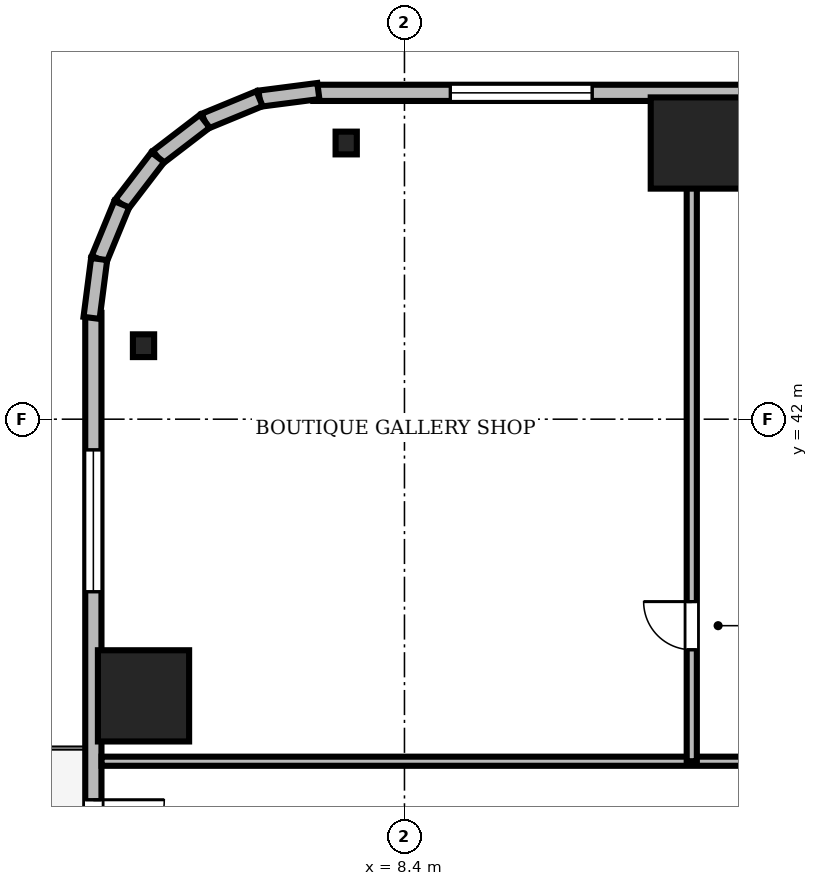
"""IFC4 building model, lengths in metres.
Left out: names, types, materials, properties, quantities, classifications, styles, units other than length and angle.
Written with IfcOpenShell. Run it as: python <this file> out.ifc"""

import sys

from ifc_helpers import new_model, si_unit, direction, frame, frame_2d, origin, origin_2d, place, context, subcontext, project, spatial, rectangle, i_section, extrude, source, transform, mapped, element, fill, save


model = new_model("IFC4")
c1 = context("Model", 3, precision=1e-05, world=origin(), true_north=direction((0.0, 1.0)))
c2 = subcontext(c1, "Body", "Model", "MODEL_VIEW")
j1 = project(units=[si_unit("LENGTHUNIT", "METRE"), si_unit("PLANEANGLEUNIT", "RADIAN")], contexts=[c1])
p1 = place(None, origin())
s1 = spatial("IfcSite", under=j1, at=p1, CompositionType="ELEMENT")
p2 = place(p1, origin())
s2 = spatial("IfcBuilding", under=s1, at=p2, CompositionType="ELEMENT")
p3 = place(p2, frame((0.0, 0.0, 78.7)))
s3 = spatial("IfcBuildingStorey", under=s2, at=p3, CompositionType="ELEMENT", Elevation=78.7)
m1 = source(origin(), c2, "Body", "SweptSolid", [
    extrude(rectangle(XDim=1.8, YDim=1.8, at=origin_2d()), origin(), (0.0, 0.0, 1.0), 3.41),
])
for number, where, z_axis, x_axis in (
    (1, (14.16, 47.45, 0.0), (0.0, 0.0, 1.0), (1.0, 0.0, 0.0)),
    (2, (3.25, 36.54, 0.0), (0.0, 0.0, 1.0), (1.0, 0.0, 0.0)),
):
    element("IfcColumn", number, at=place(p3, frame(where, z_axis=z_axis, x_axis=x_axis)), inside=s3, PredefinedType="COLUMN", context=c2, shape_type="MappedRepresentation", body=[
        mapped(m1, transform((0.0, 0.0, 0.0), scale=1.0)),
    ])
m2 = source(origin(), c2, "Body", "SweptSolid", [
    extrude(i_section(OverallWidth=0.419, OverallDepth=0.449, WebThickness=0.031, FlangeThickness=0.048, FilletRadius=0.015, at=origin_2d()), origin(), (0.0, 0.0, 1.0), 3.41),
])
for number, where, z_axis, x_axis in (
    (3, (7.25, 47.45, 0.0), (0.0, 0.0, 1.0), (1.0, 0.0, 0.0)),
    (4, (3.25, 43.45, 0.0), (0.0, 0.0, 1.0), (1.0, 0.0, 0.0)),
):
    element("IfcColumn", number, at=place(p3, frame(where, z_axis=z_axis, x_axis=x_axis)), inside=s3, PredefinedType="COLUMN", context=c2, shape_type="MappedRepresentation", body=[
        mapped(m2, transform((0.0, 0.0, 0.0), scale=1.0)),
    ])
m3 = source(origin(), c2, "Body", "SweptSolid", [
    extrude(rectangle(XDim=15.6, YDim=0.32, at=frame_2d((7.8, 0.0))), origin(), (0.0, 0.0, 1.0), 3.41),
])
p4 = place(p3, frame((22.2, 48.44, 0.0), z_axis=(0.0, 0.0, 1.0), x_axis=(-1.0, 0.0, 0.0)))
e5 = element("IfcWall", 5, at=p4, inside=s3, PredefinedType="SOLIDWALL", context=c2, shape_type="MappedRepresentation", body=[
    mapped(m3, transform((0.0, 0.0, 0.0), scale=1.0)),
])
m4 = source(origin(), c2, "Body", "SweptSolid", [
    extrude(rectangle(XDim=2.8, YDim=2.4, at=frame_2d((1.4, 1.2))), frame((0.0, 0.17, 0.0), z_axis=(0.0, -1.0, 0.0), x_axis=(1.0, 0.0, 0.0)), (0.0, 0.0, 1.0), 0.34),
])
p5 = place(p4, frame((10.095, 0.0, 0.72)))
e6 = element("IfcOpeningElement", 6, at=p5, cuts=e5, PredefinedType="OPENING", context=c2, shape_type="MappedRepresentation", body=[
    mapped(m4, transform((0.0, 0.0, 0.0), scale=1.0)),
])
m5 = source(origin(), c2, "Body", "SweptSolid", [
    extrude(rectangle(XDim=15.6, YDim=0.32, at=frame_2d((7.8, 0.0))), origin(), (0.0, 0.0, 1.0), 3.41),
])
p6 = place(p3, frame((2.26, 44.1, 0.0), z_axis=(0.0, 0.0, 1.0), x_axis=(0.0, -1.0, 0.0)))
e7 = element("IfcWall", 7, at=p6, inside=s3, PredefinedType="SOLIDWALL", context=c2, shape_type="MappedRepresentation", body=[
    mapped(m5, transform((0.0, 0.0, 0.0), scale=1.0)),
])
m6 = source(origin(), c2, "Body", "SweptSolid", [
    extrude(rectangle(XDim=1.4, YDim=2.3, at=frame_2d((0.7, 1.15))), frame((0.0, 0.17, 0.0), z_axis=(0.0, -1.0, 0.0), x_axis=(1.0, 0.0, 0.0)), (0.0, 0.0, 1.0), 0.34),
])
p7 = place(p6, frame((9.61, 0.0, 0.0)))
e8 = element("IfcOpeningElement", 8, at=p7, cuts=e7, PredefinedType="OPENING", context=c2, shape_type="MappedRepresentation", body=[
    mapped(m6, transform((0.0, 0.0, 0.0), scale=1.0)),
])
p8 = place(p6, frame((2.705, 0.0, 0.72)))
e9 = element("IfcOpeningElement", 9, at=p8, cuts=e7, PredefinedType="OPENING", context=c2, shape_type="MappedRepresentation", body=[
    mapped(m4, transform((0.0, 0.0, 0.0), scale=1.0)),
])
m7 = source(origin(), c2, "Body", "SweptSolid", [
    extrude(rectangle(XDim=1.17, YDim=0.32, at=frame_2d((0.585, 0.0))), origin(), (0.0, 0.0, 1.0), 3.41),
])
p9 = place(p3, frame((6.7, 48.476, 0.0), z_axis=(0.0, 0.0, 1.0), x_axis=(-0.991735963317, -0.128295670475, 0.0)))
e10 = element("IfcWall", 10, at=p9, inside=s3, PredefinedType="SOLIDWALL", context=c2, shape_type="MappedRepresentation", body=[
    mapped(m7, transform((0.0, 0.0, 0.0), scale=1.0)),
])
m8 = source(origin(), c2, "Body", "SweptSolid", [
    extrude(rectangle(XDim=1.169, YDim=0.32, at=frame_2d((0.584, 0.0))), origin(), (0.0, 0.0, 1.0), 3.41),
])
p10 = place(p3, frame((5.54, 48.325, 0.0), z_axis=(0.0, 0.0, 1.0), x_axis=(-0.924552646638, -0.381054331552, 0.0)))
e11 = element("IfcWall", 11, at=p10, inside=s3, PredefinedType="SOLIDWALL", context=c2, shape_type="MappedRepresentation", body=[
    mapped(m8, transform((0.0, 0.0, 0.0), scale=1.0)),
])
m9 = source(origin(), c2, "Body", "SweptSolid", [
    extrude(rectangle(XDim=1.169, YDim=0.32, at=frame_2d((0.584, 0.0))), origin(), (0.0, 0.0, 1.0), 3.41),
])
p11 = place(p3, frame((4.459, 47.88, 0.0), z_axis=(0.0, 0.0, 1.0), x_axis=(-0.793663520347, -0.608356981114, 0.0)))
e12 = element("IfcWall", 12, at=p11, inside=s3, PredefinedType="SOLIDWALL", context=c2, shape_type="MappedRepresentation", body=[
    mapped(m9, transform((0.0, 0.0, 0.0), scale=1.0)),
])
m10 = source(origin(), c2, "Body", "SweptSolid", [
    extrude(rectangle(XDim=1.169, YDim=0.32, at=frame_2d((0.584, 0.0))), origin(), (0.0, 0.0, 1.0), 3.41),
])
p12 = place(p3, frame((3.531, 47.169, 0.0), z_axis=(0.0, 0.0, 1.0), x_axis=(-0.608387696831, -0.793639975269, 0.0)))
e13 = element("IfcWall", 13, at=p12, inside=s3, PredefinedType="SOLIDWALL", context=c2, shape_type="MappedRepresentation", body=[
    mapped(m10, transform((0.0, 0.0, 0.0), scale=1.0)),
])
p13 = place(p3, frame((2.82, 46.241, 0.0), z_axis=(0.0, 0.0, 1.0), x_axis=(-0.381054331552, -0.924552646638, 0.0)))
e14 = element("IfcWall", 14, at=p13, inside=s3, PredefinedType="SOLIDWALL", context=c2, shape_type="MappedRepresentation", body=[
    mapped(m8, transform((0.0, 0.0, 0.0), scale=1.0)),
])
p14 = place(p3, frame((2.375, 45.16, 0.0), z_axis=(0.0, 0.0, 1.0), x_axis=(-0.128295670475, -0.991735963317, 0.0)))
e15 = element("IfcWall", 15, at=p14, inside=s3, PredefinedType="SOLIDWALL", context=c2, shape_type="MappedRepresentation", body=[
    mapped(m7, transform((0.0, 0.0, 0.0), scale=1.0)),
])
m11 = source(origin(), c2, "Body", "SweptSolid", [
    extrude(rectangle(XDim=19.078, YDim=0.18, at=frame_2d((9.539, 0.0))), origin(), (0.0, 0.0, 1.0), 2.652),
])
p15 = place(p3, frame((2.422, 35.25, 0.0), z_axis=(0.0, 0.0, 1.0), x_axis=(1.0, 0.0, 0.0)))
e16 = element("IfcWall", 16, at=p15, inside=s3, PredefinedType="PARTITIONING", context=c2, shape_type="MappedRepresentation", body=[
    mapped(m11, transform((0.0, 0.0, 0.0), scale=1.0)),
])
m12 = source(origin(), c2, "Body", "SweptSolid", [
    extrude(rectangle(XDim=1.05, YDim=2.2, at=frame_2d((0.525, 1.1))), frame((0.0, 0.1, 0.0), z_axis=(0.0, -1.0, 0.0), x_axis=(1.0, 0.0, 0.0)), (0.0, 0.0, 1.0), 0.2),
])
p16 = place(p15, frame((14.843, 0.0, 0.0)))
e17 = element("IfcOpeningElement", 17, at=p16, cuts=e16, PredefinedType="OPENING", context=c2, shape_type="MappedRepresentation", body=[
    mapped(m12, transform((0.0, 0.0, 0.0), scale=1.0)),
])
m13 = source(origin(), c2, "Body", "SweptSolid", [
    extrude(rectangle(XDim=13.028, YDim=0.2, at=frame_2d((6.514, 0.0))), origin(), (0.0, 0.0, 1.0), 2.652),
])
p17 = place(p3, frame((14.07, 35.25, 0.0), z_axis=(0.0, 0.0, 1.0), x_axis=(0.0, 1.0, 0.0)))
e18 = element("IfcWall", 18, at=p17, inside=s3, PredefinedType="PARTITIONING", context=c2, shape_type="MappedRepresentation", body=[
    mapped(m13, transform((0.0, 0.0, 0.0), scale=1.0)),
])
m14 = source(origin(), c2, "Body", "SweptSolid", [
    extrude(rectangle(XDim=0.95, YDim=2.15, at=frame_2d((0.475, 1.075))), frame((0.0, 0.11, 0.0), z_axis=(0.0, -1.0, 0.0), x_axis=(1.0, 0.0, 0.0)), (0.0, 0.0, 1.0), 0.22),
])
p18 = place(p17, frame((2.2, 0.0, 0.0)))
e19 = element("IfcOpeningElement", 19, at=p18, cuts=e18, PredefinedType="OPENING", context=c2, shape_type="MappedRepresentation", body=[
    mapped(m14, transform((0.0, 0.0, 0.0), scale=1.0)),
])
m15 = source(origin(), c2, "Body", "SweptSolid", [
    extrude(rectangle(XDim=2.8, YDim=2.4, at=frame_2d((1.4, 1.2))), frame((0.0, 0.03, 0.0), z_axis=(0.0, -1.0, 0.0), x_axis=(1.0, 0.0, 0.0)), (0.0, 0.0, 1.0), 0.06),
])
p19 = place(p5, origin())
e20 = element("IfcWindow", 20, at=p19, inside=s3, PartitioningType="SINGLE_PANEL", PredefinedType="WINDOW", context=c2, shape_type="MappedRepresentation", body=[
    mapped(m15, transform((0.0, 0.0, 0.0), scale=1.0)),
])
fill(e6, e20)
m16 = source(origin(), c2, "Body", "SweptSolid", [
    extrude(rectangle(XDim=1.4, YDim=2.3, at=frame_2d((0.7, 1.15))), frame((0.0, 0.025, 0.0), z_axis=(0.0, -1.0, 0.0), x_axis=(1.0, 0.0, 0.0)), (0.0, 0.0, 1.0), 0.05),
])
p20 = place(p7, frame((1.4, 0.0, 0.0), z_axis=(0.0, 0.0, 1.0), x_axis=(-1.0, 0.0, 0.0)))
e21 = element("IfcDoor", 21, at=p20, inside=s3, OperationType="DOUBLE_DOOR_SLIDING", PredefinedType="DOOR", context=c2, shape_type="MappedRepresentation", body=[
    mapped(m16, transform((0.0, 0.0, 0.0), scale=1.0)),
])
fill(e8, e21)
p21 = place(p8, origin())
e22 = element("IfcWindow", 22, at=p21, inside=s3, PartitioningType="SINGLE_PANEL", PredefinedType="WINDOW", context=c2, shape_type="MappedRepresentation", body=[
    mapped(m15, transform((0.0, 0.0, 0.0), scale=1.0)),
])
fill(e9, e22)
m17 = source(origin(), c2, "Body", "SweptSolid", [
    extrude(rectangle(XDim=0.95, YDim=2.15, at=frame_2d((0.475, 1.075))), frame((0.0, 0.025, 0.0), z_axis=(0.0, -1.0, 0.0), x_axis=(1.0, 0.0, 0.0)), (0.0, 0.0, 1.0), 0.05),
])
p22 = place(p18, origin())
e23 = element("IfcDoor", 23, at=p22, inside=s3, OperationType="SINGLE_SWING_RIGHT", PredefinedType="DOOR", context=c2, shape_type="MappedRepresentation", body=[
    mapped(m17, transform((0.0, 0.0, 0.0), scale=1.0)),
])
fill(e19, e23)
save(model, sys.argv[1])
